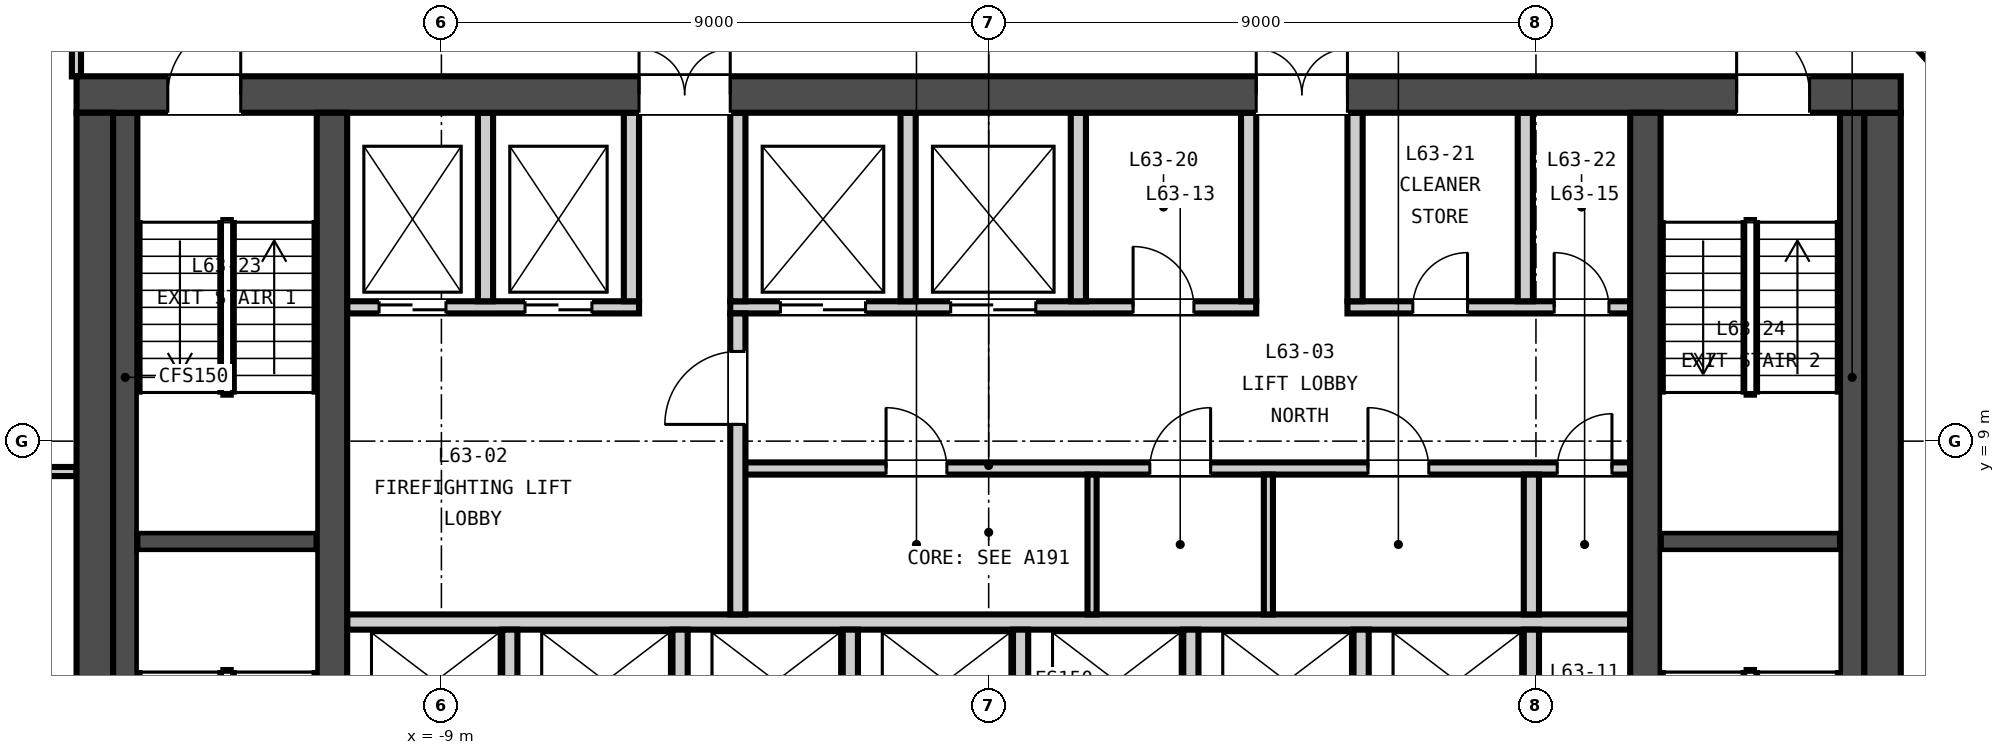
"""IFC4 building model, lengths in metres.
Left out: names, types, materials, properties, quantities, classifications, styles, units other than length and angle.
Written with IfcOpenShell. Run it as: python <this file> out.ifc"""

import sys

from ifc_helpers import new_model, si_unit, direction, frame, frame_2d, origin, place, context, subcontext, project, spatial, rectangle, extrude, element, fill, save


model = new_model("IFC4")
c1 = context("Model", 3, precision=1e-05, world=origin(), true_north=direction((0.0, 1.0)))
c2 = subcontext(c1, "Body", "Model", "MODEL_VIEW")
j1 = project(units=[si_unit("LENGTHUNIT", "METRE"), si_unit("PLANEANGLEUNIT", "RADIAN")], contexts=[c1])
p1 = place(None, origin())
s1 = spatial("IfcSite", under=j1, at=p1, CompositionType="ELEMENT")
p2 = place(p1, origin())
s2 = spatial("IfcBuilding", under=s1, at=p2, CompositionType="ELEMENT")
p3 = place(p2, frame((0.0, 0.0, 249.15)))
s3 = spatial("IfcBuildingStorey", under=s2, at=p3, CompositionType="ELEMENT", Elevation=249.15)
p4 = place(p3, frame((-15.0, 14.7, -0.15), z_axis=(0.0, 0.0, 1.0), x_axis=(1.0, 0.0, 0.0)))
e1 = element("IfcWall", 1, at=p4, inside=s3, PredefinedType="SOLIDWALL", context=c2, shape_type="SweptSolid", body=[
    extrude(rectangle(XDim=30.0, YDim=0.6, at=frame_2d((15.0, 0.0))), origin(), (0.0, 0.0, 1.0), 3.65),
])
p5 = place(p4, frame((9.25, 0.0, 0.15)))
e2 = element("IfcOpeningElement", 2, at=p5, cuts=e1, PredefinedType="OPENING", context=c2, shape_type="SweptSolid", body=[
    extrude(rectangle(XDim=1.5, YDim=2.1, at=frame_2d((0.75, 1.05))), frame((0.0, 0.31, 0.0), z_axis=(0.0, -1.0, 0.0), x_axis=(1.0, 0.0, 0.0)), (0.0, 0.0, 1.0), 0.62),
])
p6 = place(p4, frame((19.4, 0.0, 0.15)))
e3 = element("IfcOpeningElement", 3, at=p6, cuts=e1, PredefinedType="OPENING", context=c2, shape_type="SweptSolid", body=[
    extrude(rectangle(XDim=1.5, YDim=2.1, at=frame_2d((0.75, 1.05))), frame((0.0, 0.31, 0.0), z_axis=(0.0, -1.0, 0.0), x_axis=(1.0, 0.0, 0.0)), (0.0, 0.0, 1.0), 0.62),
])
p7 = place(p4, frame((1.5, 0.0, 0.15)))
e4 = element("IfcOpeningElement", 4, at=p7, cuts=e1, PredefinedType="OPENING", context=c2, shape_type="SweptSolid", body=[
    extrude(rectangle(XDim=1.2, YDim=2.1, at=frame_2d((0.6, 1.05))), frame((0.0, 0.31, 0.0), z_axis=(0.0, -1.0, 0.0), x_axis=(1.0, 0.0, 0.0)), (0.0, 0.0, 1.0), 0.62),
])
p8 = place(p4, frame((27.3, 0.0, 0.15)))
e5 = element("IfcOpeningElement", 5, at=p8, cuts=e1, PredefinedType="OPENING", context=c2, shape_type="SweptSolid", body=[
    extrude(rectangle(XDim=1.2, YDim=2.1, at=frame_2d((0.6, 1.05))), frame((0.0, 0.31, 0.0), z_axis=(0.0, -1.0, 0.0), x_axis=(1.0, 0.0, 0.0)), (0.0, 0.0, 1.0), 0.62),
])
for number, where, z_axis, x_axis in (
    (6, (-14.7, 0.6, -0.15), (0.0, 0.0, 1.0), (0.0, 1.0, 0.0)),
    (7, (14.7, 0.6, -0.15), (0.0, 0.0, 1.0), (0.0, 1.0, 0.0)),
):
    element("IfcWall", number, at=place(p3, frame(where, z_axis=z_axis, x_axis=x_axis)), inside=s3, PredefinedType="SOLIDWALL", context=c2, shape_type="SweptSolid", body=[
        extrude(rectangle(XDim=13.8, YDim=0.6, at=frame_2d((6.9, 0.0))), origin(), (0.0, 0.0, 1.0), 3.65),
    ])
for number, where, z_axis, x_axis in (
    (8, (-10.8, 0.6, -0.15), (0.0, 0.0, 1.0), (0.0, 1.0, 0.0)),
    (9, (10.8, 0.6, -0.15), (0.0, 0.0, 1.0), (0.0, 1.0, 0.0)),
):
    element("IfcWall", number, at=place(p3, frame(where, z_axis=z_axis, x_axis=x_axis)), inside=s3, PredefinedType="SOLIDWALL", context=c2, shape_type="SweptSolid", body=[
        extrude(rectangle(XDim=13.8, YDim=0.5, at=frame_2d((6.9, 0.0))), origin(), (0.0, 0.0, 1.0), 3.65),
    ])
p9 = place(p3, frame((-10.55, 6.025, 0.0), z_axis=(0.0, 0.0, 1.0), x_axis=(1.0, 0.0, 0.0)))
e10 = element("IfcWall", 10, at=p9, inside=s3, PredefinedType="PARTITIONING", context=c2, shape_type="SweptSolid", body=[
    extrude(rectangle(XDim=21.1, YDim=0.25, at=frame_2d((10.55, 0.0))), origin(), (0.0, 0.0, 1.0), 3.5),
])
p10 = place(p3, frame((-4.125, 8.55, 0.0), z_axis=(0.0, 0.0, 1.0), x_axis=(1.0, 0.0, 0.0)))
e11 = element("IfcWall", 11, at=p10, inside=s3, PredefinedType="PARTITIONING", context=c2, shape_type="SweptSolid", body=[
    extrude(rectangle(XDim=14.675, YDim=0.2, at=frame_2d((7.337, 0.0))), origin(), (0.0, 0.0, 1.0), 3.5),
])
p11 = place(p10, frame((2.438, 0.0, 0.0)))
e12 = element("IfcOpeningElement", 12, at=p11, cuts=e11, PredefinedType="OPENING", context=c2, shape_type="SweptSolid", body=[
    extrude(rectangle(XDim=1.0, YDim=2.1, at=frame_2d((0.5, 1.05))), frame((0.0, 0.11, 0.0), z_axis=(0.0, -1.0, 0.0), x_axis=(1.0, 0.0, 0.0)), (0.0, 0.0, 1.0), 0.22),
])
p12 = place(p10, frame((6.775, 0.0, 0.0)))
e13 = element("IfcOpeningElement", 13, at=p12, cuts=e11, PredefinedType="OPENING", context=c2, shape_type="SweptSolid", body=[
    extrude(rectangle(XDim=1.0, YDim=2.1, at=frame_2d((0.5, 1.05))), frame((0.0, 0.11, 0.0), z_axis=(0.0, -1.0, 0.0), x_axis=(1.0, 0.0, 0.0)), (0.0, 0.0, 1.0), 0.22),
])
p13 = place(p10, frame((10.363, 0.0, 0.0)))
e14 = element("IfcOpeningElement", 14, at=p13, cuts=e11, PredefinedType="OPENING", context=c2, shape_type="SweptSolid", body=[
    extrude(rectangle(XDim=1.0, YDim=2.1, at=frame_2d((0.5, 1.05))), frame((0.0, 0.11, 0.0), z_axis=(0.0, -1.0, 0.0), x_axis=(1.0, 0.0, 0.0)), (0.0, 0.0, 1.0), 0.22),
])
p14 = place(p10, frame((13.475, 0.0, 0.0)))
e15 = element("IfcOpeningElement", 15, at=p14, cuts=e11, PredefinedType="OPENING", context=c2, shape_type="SweptSolid", body=[
    extrude(rectangle(XDim=0.9, YDim=2.1, at=frame_2d((0.45, 1.05))), frame((0.0, 0.11, 0.0), z_axis=(0.0, -1.0, 0.0), x_axis=(1.0, 0.0, 0.0)), (0.0, 0.0, 1.0), 0.22),
])
p15 = place(p3, frame((-10.55, 11.2, 0.0), z_axis=(0.0, 0.0, 1.0), x_axis=(1.0, 0.0, 0.0)))
e16 = element("IfcWall", 16, at=p15, inside=s3, PredefinedType="PARTITIONING", context=c2, shape_type="SweptSolid", body=[
    extrude(rectangle(XDim=4.8, YDim=0.2, at=frame_2d((2.4, 0.0))), origin(), (0.0, 0.0, 1.0), 3.5),
])
p16 = place(p15, frame((0.525, 0.0, 0.0)))
e17 = element("IfcOpeningElement", 17, at=p16, cuts=e16, PredefinedType="OPENING", context=c2, shape_type="SweptSolid", body=[
    extrude(rectangle(XDim=1.1, YDim=2.1, at=frame_2d((0.55, 1.05))), frame((0.0, 0.11, 0.0), z_axis=(0.0, -1.0, 0.0), x_axis=(1.0, 0.0, 0.0)), (0.0, 0.0, 1.0), 0.22),
])
p17 = place(p15, frame((2.925, 0.0, 0.0)))
e18 = element("IfcOpeningElement", 18, at=p17, cuts=e16, PredefinedType="OPENING", context=c2, shape_type="SweptSolid", body=[
    extrude(rectangle(XDim=1.1, YDim=2.1, at=frame_2d((0.55, 1.05))), frame((0.0, 0.11, 0.0), z_axis=(0.0, -1.0, 0.0), x_axis=(1.0, 0.0, 0.0)), (0.0, 0.0, 1.0), 0.22),
])
p18 = place(p3, frame((-4.25, 11.2, 0.0), z_axis=(0.0, 0.0, 1.0), x_axis=(1.0, 0.0, 0.0)))
e19 = element("IfcWall", 19, at=p18, inside=s3, PredefinedType="PARTITIONING", context=c2, shape_type="SweptSolid", body=[
    extrude(rectangle(XDim=8.65, YDim=0.2, at=frame_2d((4.325, 0.0))), origin(), (0.0, 0.0, 1.0), 3.5),
])
p19 = place(p18, frame((0.825, 0.0, 0.0)))
e20 = element("IfcOpeningElement", 20, at=p19, cuts=e19, PredefinedType="OPENING", context=c2, shape_type="SweptSolid", body=[
    extrude(rectangle(XDim=1.4, YDim=2.1, at=frame_2d((0.7, 1.05))), frame((0.0, 0.11, 0.0), z_axis=(0.0, -1.0, 0.0), x_axis=(1.0, 0.0, 0.0)), (0.0, 0.0, 1.0), 0.22),
])
p20 = place(p18, frame((3.625, 0.0, 0.0)))
e21 = element("IfcOpeningElement", 21, at=p20, cuts=e19, PredefinedType="OPENING", context=c2, shape_type="SweptSolid", body=[
    extrude(rectangle(XDim=1.4, YDim=2.1, at=frame_2d((0.7, 1.05))), frame((0.0, 0.11, 0.0), z_axis=(0.0, -1.0, 0.0), x_axis=(1.0, 0.0, 0.0)), (0.0, 0.0, 1.0), 0.22),
])
p21 = place(p18, frame((6.625, 0.0, 0.0)))
e22 = element("IfcOpeningElement", 22, at=p21, cuts=e19, PredefinedType="OPENING", context=c2, shape_type="SweptSolid", body=[
    extrude(rectangle(XDim=1.0, YDim=2.1, at=frame_2d((0.5, 1.05))), frame((0.0, 0.11, 0.0), z_axis=(0.0, -1.0, 0.0), x_axis=(1.0, 0.0, 0.0)), (0.0, 0.0, 1.0), 0.22),
])
p22 = place(p3, frame((5.9, 11.2, 0.0), z_axis=(0.0, 0.0, 1.0), x_axis=(1.0, 0.0, 0.0)))
e23 = element("IfcWall", 23, at=p22, inside=s3, PredefinedType="PARTITIONING", context=c2, shape_type="SweptSolid", body=[
    extrude(rectangle(XDim=4.65, YDim=0.2, at=frame_2d((2.325, 0.0))), origin(), (0.0, 0.0, 1.0), 3.5),
])
p23 = place(p22, frame((1.075, 0.0, 0.0)))
e24 = element("IfcOpeningElement", 24, at=p23, cuts=e23, PredefinedType="OPENING", context=c2, shape_type="SweptSolid", body=[
    extrude(rectangle(XDim=0.9, YDim=2.1, at=frame_2d((0.45, 1.05))), frame((0.0, 0.11, 0.0), z_axis=(0.0, -1.0, 0.0), x_axis=(1.0, 0.0, 0.0)), (0.0, 0.0, 1.0), 0.22),
])
p24 = place(p22, frame((3.4, 0.0, 0.0)))
e25 = element("IfcOpeningElement", 25, at=p24, cuts=e23, PredefinedType="OPENING", context=c2, shape_type="SweptSolid", body=[
    extrude(rectangle(XDim=0.9, YDim=2.1, at=frame_2d((0.45, 1.05))), frame((0.0, 0.11, 0.0), z_axis=(0.0, -1.0, 0.0), x_axis=(1.0, 0.0, 0.0)), (0.0, 0.0, 1.0), 0.22),
])
p25 = place(p3, frame((-4.125, 6.15, 0.0), z_axis=(0.0, 0.0, 1.0), x_axis=(0.0, 1.0, 0.0)))
e26 = element("IfcWall", 26, at=p25, inside=s3, PredefinedType="PARTITIONING", context=c2, shape_type="SweptSolid", body=[
    extrude(rectangle(XDim=4.95, YDim=0.25, at=frame_2d((2.475, 0.0))), origin(), (0.0, 0.0, 1.0), 3.5),
])
p26 = place(p25, frame((3.125, 0.0, 0.0)))
e27 = element("IfcOpeningElement", 27, at=p26, cuts=e26, PredefinedType="OPENING", context=c2, shape_type="SweptSolid", body=[
    extrude(rectangle(XDim=1.2, YDim=2.1, at=frame_2d((0.6, 1.05))), frame((0.0, 0.135, 0.0), z_axis=(0.0, -1.0, 0.0), x_axis=(1.0, 0.0, 0.0)), (0.0, 0.0, 1.0), 0.27),
])
for number, where, z_axis, x_axis in (
    (28, (-7.875, 3.6, 0.0), (0.0, 0.0, 1.0), (0.0, 1.0, 0.0)),
    (29, (-5.075, 3.6, 0.0), (0.0, 0.0, 1.0), (0.0, 1.0, 0.0)),
    (30, (-2.275, 3.6, 0.0), (0.0, 0.0, 1.0), (0.0, 1.0, 0.0)),
    (31, (0.525, 3.6, 0.0), (0.0, 0.0, 1.0), (0.0, 1.0, 0.0)),
    (32, (3.325, 3.6, 0.0), (0.0, 0.0, 1.0), (0.0, 1.0, 0.0)),
    (33, (6.125, 3.6, 0.0), (0.0, 0.0, 1.0), (0.0, 1.0, 0.0)),
    (34, (8.925, 3.6, 0.0), (0.0, 0.0, 1.0), (0.0, 1.0, 0.0)),
):
    element("IfcWall", number, at=place(p3, frame(where, z_axis=z_axis, x_axis=x_axis)), inside=s3, PredefinedType="PARTITIONING", context=c2, shape_type="SweptSolid", body=[
        extrude(rectangle(XDim=2.3, YDim=0.25, at=frame_2d((1.15, 0.0))), origin(), (0.0, 0.0, 1.0), 3.5),
    ])
for number, where, z_axis, x_axis in (
    (35, (1.7, 6.15, 0.0), (0.0, 0.0, 1.0), (0.0, 1.0, 0.0)),
    (36, (4.6, 6.15, 0.0), (0.0, 0.0, 1.0), (0.0, 1.0, 0.0)),
):
    element("IfcWall", number, at=place(p3, frame(where, z_axis=z_axis, x_axis=x_axis)), inside=s3, PredefinedType="PARTITIONING", context=c2, shape_type="SweptSolid", body=[
        extrude(rectangle(XDim=2.3, YDim=0.15, at=frame_2d((1.15, 0.0))), origin(), (0.0, 0.0, 1.0), 3.5),
    ])
p27 = place(p3, frame((8.925, 6.15, 0.0), z_axis=(0.0, 0.0, 1.0), x_axis=(0.0, 1.0, 0.0)))
e37 = element("IfcWall", 37, at=p27, inside=s3, PredefinedType="PARTITIONING", context=c2, shape_type="SweptSolid", body=[
    extrude(rectangle(XDim=2.3, YDim=0.25, at=frame_2d((1.15, 0.0))), origin(), (0.0, 0.0, 1.0), 3.5),
])
for number, where, z_axis, x_axis in (
    (38, (-8.275, 11.3, 0.0), (0.0, 0.0, 1.0), (0.0, 1.0, 0.0)),
    (39, (-5.875, 11.3, 0.0), (0.0, 0.0, 1.0), (0.0, 1.0, 0.0)),
    (40, (-4.125, 11.3, 0.0), (0.0, 0.0, 1.0), (0.0, 1.0, 0.0)),
    (41, (-1.325, 11.3, 0.0), (0.0, 0.0, 1.0), (0.0, 1.0, 0.0)),
    (42, (1.475, 11.3, 0.0), (0.0, 0.0, 1.0), (0.0, 1.0, 0.0)),
    (43, (4.275, 11.3, 0.0), (0.0, 0.0, 1.0), (0.0, 1.0, 0.0)),
    (44, (6.025, 11.3, 0.0), (0.0, 0.0, 1.0), (0.0, 1.0, 0.0)),
    (45, (8.825, 11.3, 0.0), (0.0, 0.0, 1.0), (0.0, 1.0, 0.0)),
):
    element("IfcWall", number, at=place(p3, frame(where, z_axis=z_axis, x_axis=x_axis)), inside=s3, PredefinedType="PARTITIONING", context=c2, shape_type="SweptSolid", body=[
        extrude(rectangle(XDim=3.1, YDim=0.25, at=frame_2d((1.55, 0.0))), origin(), (0.0, 0.0, 1.0), 3.5),
    ])
p28 = place(p3, frame((-14.0, 7.35, 0.0), z_axis=(0.0, 0.0, 1.0), x_axis=(1.0, 0.0, 0.0)))
e46 = element("IfcWall", 46, at=p28, inside=s3, PredefinedType="SOLIDWALL", context=c2, shape_type="SweptSolid", body=[
    extrude(rectangle(XDim=2.95, YDim=0.3, at=frame_2d((1.475, 0.0))), origin(), (0.0, 0.0, 1.0), 3.5),
])
p29 = place(p3, frame((-14.2, 0.6, 0.0), z_axis=(0.0, 0.0, 1.0), x_axis=(0.0, 1.0, 0.0)))
e47 = element("IfcWall", 47, at=p29, inside=s3, PredefinedType="SOLIDWALL", context=c2, shape_type="SweptSolid", body=[
    extrude(rectangle(XDim=13.8, YDim=0.4, at=frame_2d((6.9, 0.0))), origin(), (0.0, 0.0, 1.0), 3.5),
])
p30 = place(p3, frame((11.05, 7.35, 0.0), z_axis=(0.0, 0.0, 1.0), x_axis=(1.0, 0.0, 0.0)))
e48 = element("IfcWall", 48, at=p30, inside=s3, PredefinedType="SOLIDWALL", context=c2, shape_type="SweptSolid", body=[
    extrude(rectangle(XDim=2.95, YDim=0.3, at=frame_2d((1.475, 0.0))), origin(), (0.0, 0.0, 1.0), 3.5),
])
p31 = place(p3, frame((14.2, 0.6, 0.0), z_axis=(0.0, 0.0, 1.0), x_axis=(0.0, 1.0, 0.0)))
e49 = element("IfcWall", 49, at=p31, inside=s3, PredefinedType="SOLIDWALL", context=c2, shape_type="SweptSolid", body=[
    extrude(rectangle(XDim=13.8, YDim=0.4, at=frame_2d((6.9, 0.0))), origin(), (0.0, 0.0, 1.0), 3.5),
])
p32 = place(p3, frame((-15.002, 14.998, 0.0), z_axis=(0.0, 0.0, 1.0), x_axis=(0.000965483499, 0.999999533921, 0.0)))
e50 = element("IfcWall", 50, at=p32, inside=s3, PredefinedType="PARTITIONING", context=c2, shape_type="SweptSolid", body=[
    extrude(rectangle(XDim=2.023, YDim=0.15, at=frame_2d((1.011, 0.0))), origin(), (0.0, 0.0, 1.0), 2.751),
])
p33 = place(p3, frame((-17.125, 8.5, 0.0), z_axis=(0.0, 0.0, 1.0), x_axis=(1.0, 0.0, 0.0)))
e51 = element("IfcWall", 51, at=p33, inside=s3, PredefinedType="PARTITIONING", context=c2, shape_type="SweptSolid", body=[
    extrude(rectangle(XDim=2.125, YDim=0.15, at=frame_2d((1.062, 0.0))), origin(), (0.0, 0.0, 1.0), 2.751),
])
p34 = place(p3, frame((14.476, 16.433, 0.0), z_axis=(0.0, 0.0, 1.0), x_axis=(0.669204384193, -0.743078388985, 0.0)))
e52 = element("IfcWall", 52, at=p34, inside=s3, PredefinedType="PARTITIONING", context=c2, shape_type="SweptSolid", body=[
    extrude(rectangle(XDim=3.996, YDim=0.15, at=frame_2d((1.998, 0.0))), origin(), (0.0, 0.0, 1.0), 2.751),
])
p35 = place(p26, origin())
e53 = element("IfcDoor", 53, at=p35, inside=s3, OperationType="SINGLE_SWING_LEFT", PredefinedType="DOOR", context=c2, shape_type="SweptSolid", body=[
    extrude(rectangle(XDim=1.2, YDim=2.1, at=frame_2d((0.6, 1.05))), frame((0.0, 0.025, 0.0), z_axis=(0.0, -1.0, 0.0), x_axis=(1.0, 0.0, 0.0)), (0.0, 0.0, 1.0), 0.05),
])
fill(e27, e53)
p36 = place(p11, origin())
e54 = element("IfcDoor", 54, at=p36, inside=s3, OperationType="SINGLE_SWING_LEFT", PredefinedType="DOOR", context=c2, shape_type="SweptSolid", body=[
    extrude(rectangle(XDim=1.0, YDim=2.1, at=frame_2d((0.5, 1.05))), frame((0.0, 0.025, 0.0), z_axis=(0.0, -1.0, 0.0), x_axis=(1.0, 0.0, 0.0)), (0.0, 0.0, 1.0), 0.05),
])
fill(e12, e54)
p37 = place(p12, origin())
e55 = element("IfcDoor", 55, at=p37, inside=s3, OperationType="SINGLE_SWING_RIGHT", PredefinedType="DOOR", context=c2, shape_type="SweptSolid", body=[
    extrude(rectangle(XDim=1.0, YDim=2.1, at=frame_2d((0.5, 1.05))), frame((0.0, 0.025, 0.0), z_axis=(0.0, -1.0, 0.0), x_axis=(1.0, 0.0, 0.0)), (0.0, 0.0, 1.0), 0.05),
])
fill(e13, e55)
p38 = place(p13, origin())
e56 = element("IfcDoor", 56, at=p38, inside=s3, OperationType="SINGLE_SWING_LEFT", PredefinedType="DOOR", context=c2, shape_type="SweptSolid", body=[
    extrude(rectangle(XDim=1.0, YDim=2.1, at=frame_2d((0.5, 1.05))), frame((0.0, 0.025, 0.0), z_axis=(0.0, -1.0, 0.0), x_axis=(1.0, 0.0, 0.0)), (0.0, 0.0, 1.0), 0.05),
])
fill(e14, e56)
p39 = place(p14, origin())
e57 = element("IfcDoor", 57, at=p39, inside=s3, OperationType="SINGLE_SWING_RIGHT", PredefinedType="DOOR", context=c2, shape_type="SweptSolid", body=[
    extrude(rectangle(XDim=0.9, YDim=2.1, at=frame_2d((0.45, 1.05))), frame((0.0, 0.025, 0.0), z_axis=(0.0, -1.0, 0.0), x_axis=(1.0, 0.0, 0.0)), (0.0, 0.0, 1.0), 0.05),
])
fill(e15, e57)
p40 = place(p16, origin())
e58 = element("IfcDoor", 58, at=p40, inside=s3, OperationType="DOUBLE_DOOR_SLIDING", PredefinedType="DOOR", context=c2, shape_type="SweptSolid", body=[
    extrude(rectangle(XDim=1.1, YDim=2.1, at=frame_2d((0.55, 1.05))), frame((0.0, 0.025, 0.0), z_axis=(0.0, -1.0, 0.0), x_axis=(1.0, 0.0, 0.0)), (0.0, 0.0, 1.0), 0.05),
])
fill(e17, e58)
p41 = place(p17, origin())
e59 = element("IfcDoor", 59, at=p41, inside=s3, OperationType="DOUBLE_DOOR_SLIDING", PredefinedType="DOOR", context=c2, shape_type="SweptSolid", body=[
    extrude(rectangle(XDim=1.1, YDim=2.1, at=frame_2d((0.55, 1.05))), frame((0.0, 0.025, 0.0), z_axis=(0.0, -1.0, 0.0), x_axis=(1.0, 0.0, 0.0)), (0.0, 0.0, 1.0), 0.05),
])
fill(e18, e59)
p42 = place(p19, origin())
e60 = element("IfcDoor", 60, at=p42, inside=s3, OperationType="DOUBLE_DOOR_SLIDING", PredefinedType="DOOR", context=c2, shape_type="SweptSolid", body=[
    extrude(rectangle(XDim=1.4, YDim=2.1, at=frame_2d((0.7, 1.05))), frame((0.0, 0.025, 0.0), z_axis=(0.0, -1.0, 0.0), x_axis=(1.0, 0.0, 0.0)), (0.0, 0.0, 1.0), 0.05),
])
fill(e20, e60)
p43 = place(p20, origin())
e61 = element("IfcDoor", 61, at=p43, inside=s3, OperationType="DOUBLE_DOOR_SLIDING", PredefinedType="DOOR", context=c2, shape_type="SweptSolid", body=[
    extrude(rectangle(XDim=1.4, YDim=2.1, at=frame_2d((0.7, 1.05))), frame((0.0, 0.025, 0.0), z_axis=(0.0, -1.0, 0.0), x_axis=(1.0, 0.0, 0.0)), (0.0, 0.0, 1.0), 0.05),
])
fill(e21, e61)
p44 = place(p21, origin())
e62 = element("IfcDoor", 62, at=p44, inside=s3, OperationType="SINGLE_SWING_LEFT", PredefinedType="DOOR", context=c2, shape_type="SweptSolid", body=[
    extrude(rectangle(XDim=1.0, YDim=2.1, at=frame_2d((0.5, 1.05))), frame((0.0, 0.025, 0.0), z_axis=(0.0, -1.0, 0.0), x_axis=(1.0, 0.0, 0.0)), (0.0, 0.0, 1.0), 0.05),
])
fill(e22, e62)
p45 = place(p23, origin())
e63 = element("IfcDoor", 63, at=p45, inside=s3, OperationType="SINGLE_SWING_RIGHT", PredefinedType="DOOR", context=c2, shape_type="SweptSolid", body=[
    extrude(rectangle(XDim=0.9, YDim=2.1, at=frame_2d((0.45, 1.05))), frame((0.0, 0.025, 0.0), z_axis=(0.0, -1.0, 0.0), x_axis=(1.0, 0.0, 0.0)), (0.0, 0.0, 1.0), 0.05),
])
fill(e24, e63)
p46 = place(p24, origin())
e64 = element("IfcDoor", 64, at=p46, inside=s3, OperationType="SINGLE_SWING_LEFT", PredefinedType="DOOR", context=c2, shape_type="SweptSolid", body=[
    extrude(rectangle(XDim=0.9, YDim=2.1, at=frame_2d((0.45, 1.05))), frame((0.0, 0.025, 0.0), z_axis=(0.0, -1.0, 0.0), x_axis=(1.0, 0.0, 0.0)), (0.0, 0.0, 1.0), 0.05),
])
fill(e25, e64)
p47 = place(p5, origin())
e65 = element("IfcDoor", 65, at=p47, inside=s3, OperationType="DOUBLE_DOOR_SINGLE_SWING", PredefinedType="DOOR", context=c2, shape_type="SweptSolid", body=[
    extrude(rectangle(XDim=1.5, YDim=2.1, at=frame_2d((0.75, 1.05))), frame((0.0, 0.025, 0.0), z_axis=(0.0, -1.0, 0.0), x_axis=(1.0, 0.0, 0.0)), (0.0, 0.0, 1.0), 0.05),
])
fill(e2, e65)
p48 = place(p6, origin())
e66 = element("IfcDoor", 66, at=p48, inside=s3, OperationType="DOUBLE_DOOR_SINGLE_SWING", PredefinedType="DOOR", context=c2, shape_type="SweptSolid", body=[
    extrude(rectangle(XDim=1.5, YDim=2.1, at=frame_2d((0.75, 1.05))), frame((0.0, 0.025, 0.0), z_axis=(0.0, -1.0, 0.0), x_axis=(1.0, 0.0, 0.0)), (0.0, 0.0, 1.0), 0.05),
])
fill(e3, e66)
p49 = place(p7, origin())
e67 = element("IfcDoor", 67, at=p49, inside=s3, OperationType="SINGLE_SWING_RIGHT", PredefinedType="DOOR", context=c2, shape_type="SweptSolid", body=[
    extrude(rectangle(XDim=1.2, YDim=2.1, at=frame_2d((0.6, 1.05))), frame((0.0, 0.025, 0.0), z_axis=(0.0, -1.0, 0.0), x_axis=(1.0, 0.0, 0.0)), (0.0, 0.0, 1.0), 0.05),
])
fill(e4, e67)
p50 = place(p8, origin())
e68 = element("IfcDoor", 68, at=p50, inside=s3, OperationType="SINGLE_SWING_LEFT", PredefinedType="DOOR", context=c2, shape_type="SweptSolid", body=[
    extrude(rectangle(XDim=1.2, YDim=2.1, at=frame_2d((0.6, 1.05))), frame((0.0, 0.025, 0.0), z_axis=(0.0, -1.0, 0.0), x_axis=(1.0, 0.0, 0.0)), (0.0, 0.0, 1.0), 0.05),
])
fill(e5, e68)
save(model, sys.argv[1])
